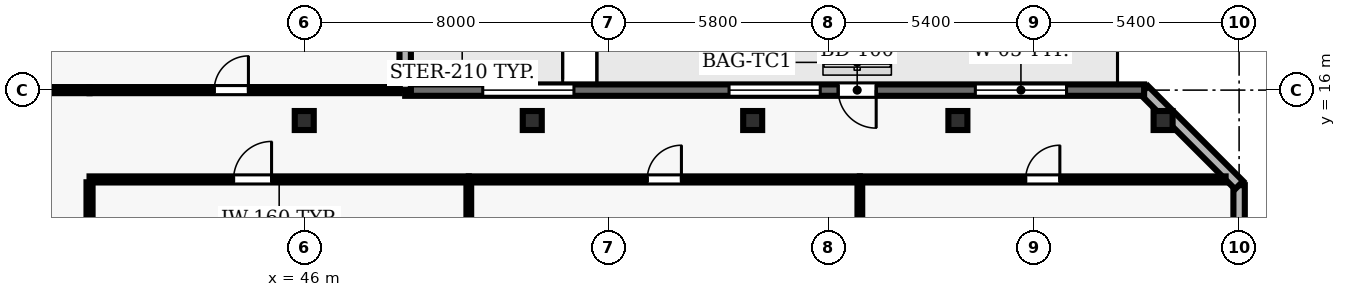
"""IFC4 building model, lengths in metres.
Left out: names, types, materials, properties, quantities, classifications, styles, units other than length and angle.
Written with IfcOpenShell. Run it as: python <this file> out.ifc"""

import sys

from ifc_helpers import new_model, si_unit, direction, frame, frame_2d, origin, origin_2d, place, context, subcontext, project, spatial, rectangle, hollow_rectangle, extrude, element, fill, save


model = new_model("IFC4")
c1 = context("Model", 3, precision=1e-05, world=origin(), true_north=direction((0.0, 1.0)))
c2 = subcontext(c1, "Body", "Model", "MODEL_VIEW")
j1 = project(units=[si_unit("LENGTHUNIT", "METRE"), si_unit("PLANEANGLEUNIT", "RADIAN")], contexts=[c1])
p1 = place(None, origin())
s1 = spatial("IfcSite", under=j1, at=p1, CompositionType="ELEMENT")
p2 = place(p1, origin())
s2 = spatial("IfcBuilding", under=s1, at=p2, CompositionType="ELEMENT")
p3 = place(p2, frame((0.0, 0.0, 103.4)))
s3 = spatial("IfcBuildingStorey", under=s2, at=p3, CompositionType="ELEMENT", Elevation=103.4)
for number, where, z_axis, x_axis in (
    (1, (46.0, 15.2, 0.0), (0.0, 0.0, 1.0), (1.0, 0.0, 0.0)),
    (2, (52.0, 15.2, 0.0), (0.0, 0.0, 1.0), (1.0, 0.0, 0.0)),
    (3, (57.8, 15.2, 0.0), (0.0, 0.0, 1.0), (1.0, 0.0, 0.0)),
    (4, (63.2, 15.2, 0.0), (0.0, 0.0, 1.0), (1.0, 0.0, 0.0)),
    (5, (68.6, 15.2, 0.0), (0.0, 0.0, 1.0), (1.0, 0.0, 0.0)),
):
    element("IfcColumn", number, at=place(p3, frame(where, z_axis=z_axis, x_axis=x_axis)), inside=s3, PredefinedType="COLUMN", context=c2, shape_type="SweptSolid", body=[
        extrude(hollow_rectangle(XDim=0.5, YDim=0.5, WallThickness=0.025, at=origin_2d()), origin(), (0.0, 0.0, 1.0), 3.9),
    ])
p4 = place(p3, frame((70.6, 2.5, 0.0), z_axis=(0.0, 0.0, 1.0), x_axis=(0.0, 1.0, 0.0)))
e6 = element("IfcWall", 6, at=p4, inside=s3, PredefinedType="SOLIDWALL", context=c2, shape_type="SweptSolid", body=[
    extrude(rectangle(XDim=11.0, YDim=0.3, at=frame_2d((5.5, 0.0))), origin(), (0.0, 0.0, 1.0), 3.69),
])
p5 = place(p4, frame((1.85, 0.0, 0.9)))
e7 = element("IfcOpeningElement", 7, at=p5, cuts=e6, PredefinedType="OPENING", context=c2, shape_type="SweptSolid", body=[
    extrude(rectangle(XDim=1.8, YDim=1.6, at=frame_2d((0.9, 0.8))), frame((0.0, 0.16, 0.0), z_axis=(0.0, -1.0, 0.0), x_axis=(1.0, 0.0, 0.0)), (0.0, 0.0, 1.0), 0.32),
])
p6 = place(p4, frame((7.35, 0.0, 0.9)))
e8 = element("IfcOpeningElement", 8, at=p6, cuts=e6, PredefinedType="OPENING", context=c2, shape_type="SweptSolid", body=[
    extrude(rectangle(XDim=1.8, YDim=1.6, at=frame_2d((0.9, 0.8))), frame((0.0, 0.16, 0.0), z_axis=(0.0, -1.0, 0.0), x_axis=(1.0, 0.0, 0.0)), (0.0, 0.0, 1.0), 0.32),
])
p7 = place(p3, frame((70.6, 13.5, 0.0), z_axis=(0.0, 0.0, 1.0), x_axis=(-0.707106781187, 0.707106781187, 0.0)))
e9 = element("IfcWall", 9, at=p7, inside=s3, PredefinedType="SOLIDWALL", context=c2, shape_type="SweptSolid", body=[
    extrude(rectangle(XDim=3.536, YDim=0.3, at=frame_2d((1.768, 0.0))), origin(), (0.0, 0.0, 1.0), 3.69),
])
p8 = place(p3, frame((68.1, 16.0, 0.0), z_axis=(0.0, 0.0, 1.0), x_axis=(-1.0, 0.0, 0.0)))
e10 = element("IfcWall", 10, at=p8, inside=s3, PredefinedType="SOLIDWALL", context=c2, shape_type="SweptSolid", body=[
    extrude(rectangle(XDim=19.444, YDim=0.3, at=frame_2d((9.722, 0.0))), origin(), (0.0, 0.0, 1.0), 3.69),
])
p9 = place(p8, frame((7.05, 0.0, 0.0)))
e11 = element("IfcOpeningElement", 11, at=p9, cuts=e10, PredefinedType="OPENING", context=c2, shape_type="SweptSolid", body=[
    extrude(rectangle(XDim=1.0, YDim=2.2, at=frame_2d((0.5, 1.1))), frame((0.0, 0.16, 0.0), z_axis=(0.0, -1.0, 0.0), x_axis=(1.0, 0.0, 0.0)), (0.0, 0.0, 1.0), 0.32),
])
p10 = place(p8, frame((2.041, 0.0, 0.9)))
e12 = element("IfcOpeningElement", 12, at=p10, cuts=e10, PredefinedType="OPENING", context=c2, shape_type="SweptSolid", body=[
    extrude(rectangle(XDim=2.4, YDim=1.6, at=frame_2d((1.2, 0.8))), frame((0.0, 0.16, 0.0), z_axis=(0.0, -1.0, 0.0), x_axis=(1.0, 0.0, 0.0)), (0.0, 0.0, 1.0), 0.32),
])
p11 = place(p8, frame((8.522, 0.0, 0.9)))
e13 = element("IfcOpeningElement", 13, at=p11, cuts=e10, PredefinedType="OPENING", context=c2, shape_type="SweptSolid", body=[
    extrude(rectangle(XDim=2.4, YDim=1.6, at=frame_2d((1.2, 0.8))), frame((0.0, 0.16, 0.0), z_axis=(0.0, -1.0, 0.0), x_axis=(1.0, 0.0, 0.0)), (0.0, 0.0, 1.0), 0.32),
])
p12 = place(p8, frame((15.003, 0.0, 0.9)))
e14 = element("IfcOpeningElement", 14, at=p12, cuts=e10, PredefinedType="OPENING", context=c2, shape_type="SweptSolid", body=[
    extrude(rectangle(XDim=2.4, YDim=1.6, at=frame_2d((1.2, 0.8))), frame((0.0, 0.16, 0.0), z_axis=(0.0, -1.0, 0.0), x_axis=(1.0, 0.0, 0.0)), (0.0, 0.0, 1.0), 0.32),
])
p13 = place(p3, frame((48.656, 16.0, 0.0), z_axis=(0.0, 0.0, 1.0), x_axis=(0.0, 1.0, 0.0)))
e15 = element("IfcWall", 15, at=p13, inside=s3, PredefinedType="SOLIDWALL", context=c2, shape_type="SweptSolid", body=[
    extrude(rectangle(XDim=13.6, YDim=0.3, at=frame_2d((6.8, 0.0))), origin(), (0.0, 0.0, 1.0), 3.69),
])
p14 = place(p13, frame((4.8, 0.0, 0.0)))
e16 = element("IfcOpeningElement", 16, at=p14, cuts=e15, PredefinedType="OPENING", context=c2, shape_type="SweptSolid", body=[
    extrude(rectangle(XDim=1.35, YDim=2.2, at=frame_2d((0.675, 1.1))), frame((0.0, 0.16, 0.0), z_axis=(0.0, -1.0, 0.0), x_axis=(1.0, 0.0, 0.0)), (0.0, 0.0, 1.0), 0.32),
])
p15 = place(p13, frame((2.65, 0.0, 0.9)))
e17 = element("IfcOpeningElement", 17, at=p15, cuts=e15, PredefinedType="OPENING", context=c2, shape_type="SweptSolid", body=[
    extrude(rectangle(XDim=1.5, YDim=1.8, at=frame_2d((0.75, 0.9))), frame((0.0, 0.16, 0.0), z_axis=(0.0, -1.0, 0.0), x_axis=(1.0, 0.0, 0.0)), (0.0, 0.0, 1.0), 0.32),
])
p16 = place(p13, frame((9.45, 0.0, 0.9)))
e18 = element("IfcOpeningElement", 18, at=p16, cuts=e15, PredefinedType="OPENING", context=c2, shape_type="SweptSolid", body=[
    extrude(rectangle(XDim=1.5, YDim=1.8, at=frame_2d((0.75, 0.9))), frame((0.0, 0.16, 0.0), z_axis=(0.0, -1.0, 0.0), x_axis=(1.0, 0.0, 0.0)), (0.0, 0.0, 1.0), 0.32),
])
p17 = place(p3, frame((40.35, 13.65, 0.0), z_axis=(0.0, 0.0, 1.0), x_axis=(1.0, 0.0, 0.0)))
e19 = element("IfcWall", 19, at=p17, inside=s3, PredefinedType="PARTITIONING", context=c2, shape_type="SweptSolid", body=[
    extrude(rectangle(XDim=9.98, YDim=0.16, at=frame_2d((4.99, 0.0))), origin(), (0.0, 0.0, 1.0), 3.69),
])
p18 = place(p17, frame((3.79, 0.0, 0.0)))
e20 = element("IfcOpeningElement", 20, at=p18, cuts=e19, PredefinedType="OPENING", context=c2, shape_type="SweptSolid", body=[
    extrude(rectangle(XDim=1.0, YDim=2.1, at=frame_2d((0.5, 1.05))), frame((0.0, 0.09, 0.0), z_axis=(0.0, -1.0, 0.0), x_axis=(1.0, 0.0, 0.0)), (0.0, 0.0, 1.0), 0.18),
])
p19 = place(p3, frame((40.35, 16.0, 0.0), z_axis=(0.0, 0.0, 1.0), x_axis=(-1.0, 0.0, 0.0)))
e21 = element("IfcWall", 21, at=p19, inside=s3, PredefinedType="PARTITIONING", context=c2, shape_type="SweptSolid", body=[
    extrude(rectangle(XDim=2.3, YDim=0.16, at=frame_2d((1.15, 0.0))), origin(), (0.0, 0.0, 1.0), 3.69),
])
p20 = place(p3, frame((40.35, 16.0, 0.0), z_axis=(0.0, 0.0, 1.0), x_axis=(1.0, 0.0, 0.0)))
e22 = element("IfcWall", 22, at=p20, inside=s3, PredefinedType="PARTITIONING", context=c2, shape_type="SweptSolid", body=[
    extrude(rectangle(XDim=8.161, YDim=0.16, at=frame_2d((4.081, 0.0))), origin(), (0.0, 0.0, 1.0), 3.69),
])
p21 = place(p20, frame((3.281, 0.0, 0.0)))
e23 = element("IfcOpeningElement", 23, at=p21, cuts=e22, PredefinedType="OPENING", context=c2, shape_type="SweptSolid", body=[
    extrude(rectangle(XDim=0.9, YDim=2.1, at=frame_2d((0.45, 1.05))), frame((0.0, 0.09, 0.0), z_axis=(0.0, -1.0, 0.0), x_axis=(1.0, 0.0, 0.0)), (0.0, 0.0, 1.0), 0.18),
])
p22 = place(p3, frame((50.33, 13.65, 0.0), z_axis=(0.0, 0.0, 1.0), x_axis=(1.0, 0.0, 0.0)))
e24 = element("IfcWall", 24, at=p22, inside=s3, PredefinedType="PARTITIONING", context=c2, shape_type="SweptSolid", body=[
    extrude(rectangle(XDim=10.29, YDim=0.16, at=frame_2d((5.145, 0.0))), origin(), (0.0, 0.0, 1.0), 3.69),
])
p23 = place(p22, frame((4.695, 0.0, 0.0)))
e25 = element("IfcOpeningElement", 25, at=p23, cuts=e24, PredefinedType="OPENING", context=c2, shape_type="SweptSolid", body=[
    extrude(rectangle(XDim=0.9, YDim=2.1, at=frame_2d((0.45, 1.05))), frame((0.0, 0.09, 0.0), z_axis=(0.0, -1.0, 0.0), x_axis=(1.0, 0.0, 0.0)), (0.0, 0.0, 1.0), 0.18),
])
p24 = place(p3, frame((60.62, 13.65, 0.0), z_axis=(0.0, 0.0, 1.0), x_axis=(1.0, 0.0, 0.0)))
e26 = element("IfcWall", 26, at=p24, inside=s3, PredefinedType="PARTITIONING", context=c2, shape_type="SweptSolid", body=[
    extrude(rectangle(XDim=9.625, YDim=0.16, at=frame_2d((4.812, 0.0))), origin(), (0.0, 0.0, 1.0), 3.69),
])
p25 = place(p24, frame((4.363, 0.0, 0.0)))
e27 = element("IfcOpeningElement", 27, at=p25, cuts=e26, PredefinedType="OPENING", context=c2, shape_type="SweptSolid", body=[
    extrude(rectangle(XDim=0.9, YDim=2.1, at=frame_2d((0.45, 1.05))), frame((0.0, 0.09, 0.0), z_axis=(0.0, -1.0, 0.0), x_axis=(1.0, 0.0, 0.0)), (0.0, 0.0, 1.0), 0.18),
])
p26 = place(p3, frame((40.35, 8.008, 0.0), z_axis=(0.0, 0.0, 1.0), x_axis=(0.0, 1.0, 0.0)))
e28 = element("IfcWall", 28, at=p26, inside=s3, PredefinedType="PARTITIONING", context=c2, shape_type="SweptSolid", body=[
    extrude(rectangle(XDim=5.567, YDim=0.16, at=frame_2d((2.783, 0.0))), origin(), (0.0, 0.0, 1.0), 3.69),
])
for number, where, z_axis, x_axis in (
    (29, (50.33, 8.018, 0.0), (0.0, 0.0, 1.0), (0.0, 1.0, 0.0)),
    (30, (60.62, 8.018, 0.0), (0.0, 0.0, 1.0), (0.0, 1.0, 0.0)),
):
    element("IfcWall", number, at=place(p3, frame(where, z_axis=z_axis, x_axis=x_axis)), inside=s3, PredefinedType="PARTITIONING", context=c2, shape_type="SweptSolid", body=[
        extrude(rectangle(XDim=5.557, YDim=0.125, at=frame_2d((2.778, 0.0))), origin(), (0.0, 0.0, 1.0), 3.69),
    ])
p27 = place(p9, origin())
e31 = element("IfcDoor", 31, at=p27, inside=s3, OperationType="SINGLE_SWING_LEFT", PredefinedType="DOOR", context=c2, shape_type="SweptSolid", body=[
    extrude(rectangle(XDim=1.0, YDim=2.2, at=frame_2d((0.5, 1.1))), frame((0.0, 0.025, 0.0), z_axis=(0.0, -1.0, 0.0), x_axis=(1.0, 0.0, 0.0)), (0.0, 0.0, 1.0), 0.05),
])
fill(e11, e31)
p28 = place(p10, origin())
e32 = element("IfcWindow", 32, at=p28, inside=s3, PartitioningType="SINGLE_PANEL", PredefinedType="WINDOW", context=c2, shape_type="SweptSolid", body=[
    extrude(rectangle(XDim=2.4, YDim=1.6, at=frame_2d((1.2, 0.8))), frame((0.0, 0.03, 0.0), z_axis=(0.0, -1.0, 0.0), x_axis=(1.0, 0.0, 0.0)), (0.0, 0.0, 1.0), 0.06),
])
fill(e12, e32)
p29 = place(p11, origin())
e33 = element("IfcWindow", 33, at=p29, inside=s3, PartitioningType="SINGLE_PANEL", PredefinedType="WINDOW", context=c2, shape_type="SweptSolid", body=[
    extrude(rectangle(XDim=2.4, YDim=1.6, at=frame_2d((1.2, 0.8))), frame((0.0, 0.03, 0.0), z_axis=(0.0, -1.0, 0.0), x_axis=(1.0, 0.0, 0.0)), (0.0, 0.0, 1.0), 0.06),
])
fill(e13, e33)
p30 = place(p12, origin())
e34 = element("IfcWindow", 34, at=p30, inside=s3, PartitioningType="SINGLE_PANEL", PredefinedType="WINDOW", context=c2, shape_type="SweptSolid", body=[
    extrude(rectangle(XDim=2.4, YDim=1.6, at=frame_2d((1.2, 0.8))), frame((0.0, 0.03, 0.0), z_axis=(0.0, -1.0, 0.0), x_axis=(1.0, 0.0, 0.0)), (0.0, 0.0, 1.0), 0.06),
])
fill(e14, e34)
p31 = place(p18, origin())
e35 = element("IfcDoor", 35, at=p31, inside=s3, OperationType="SINGLE_SWING_RIGHT", PredefinedType="DOOR", context=c2, shape_type="SweptSolid", body=[
    extrude(rectangle(XDim=1.0, YDim=2.1, at=frame_2d((0.5, 1.05))), frame((0.0, 0.025, 0.0), z_axis=(0.0, -1.0, 0.0), x_axis=(1.0, 0.0, 0.0)), (0.0, 0.0, 1.0), 0.05),
])
fill(e20, e35)
p32 = place(p23, origin())
e36 = element("IfcDoor", 36, at=p32, inside=s3, OperationType="SINGLE_SWING_RIGHT", PredefinedType="DOOR", context=c2, shape_type="SweptSolid", body=[
    extrude(rectangle(XDim=0.9, YDim=2.1, at=frame_2d((0.45, 1.05))), frame((0.0, 0.025, 0.0), z_axis=(0.0, -1.0, 0.0), x_axis=(1.0, 0.0, 0.0)), (0.0, 0.0, 1.0), 0.05),
])
fill(e25, e36)
p33 = place(p25, origin())
e37 = element("IfcDoor", 37, at=p33, inside=s3, OperationType="SINGLE_SWING_RIGHT", PredefinedType="DOOR", context=c2, shape_type="SweptSolid", body=[
    extrude(rectangle(XDim=0.9, YDim=2.1, at=frame_2d((0.45, 1.05))), frame((0.0, 0.025, 0.0), z_axis=(0.0, -1.0, 0.0), x_axis=(1.0, 0.0, 0.0)), (0.0, 0.0, 1.0), 0.05),
])
fill(e27, e37)
p34 = place(p21, origin())
e38 = element("IfcDoor", 38, at=p34, inside=s3, OperationType="SINGLE_SWING_RIGHT", PredefinedType="DOOR", context=c2, shape_type="SweptSolid", body=[
    extrude(rectangle(XDim=0.9, YDim=2.1, at=frame_2d((0.45, 1.05))), frame((0.0, 0.025, 0.0), z_axis=(0.0, -1.0, 0.0), x_axis=(1.0, 0.0, 0.0)), (0.0, 0.0, 1.0), 0.05),
])
fill(e23, e38)
save(model, sys.argv[1])
